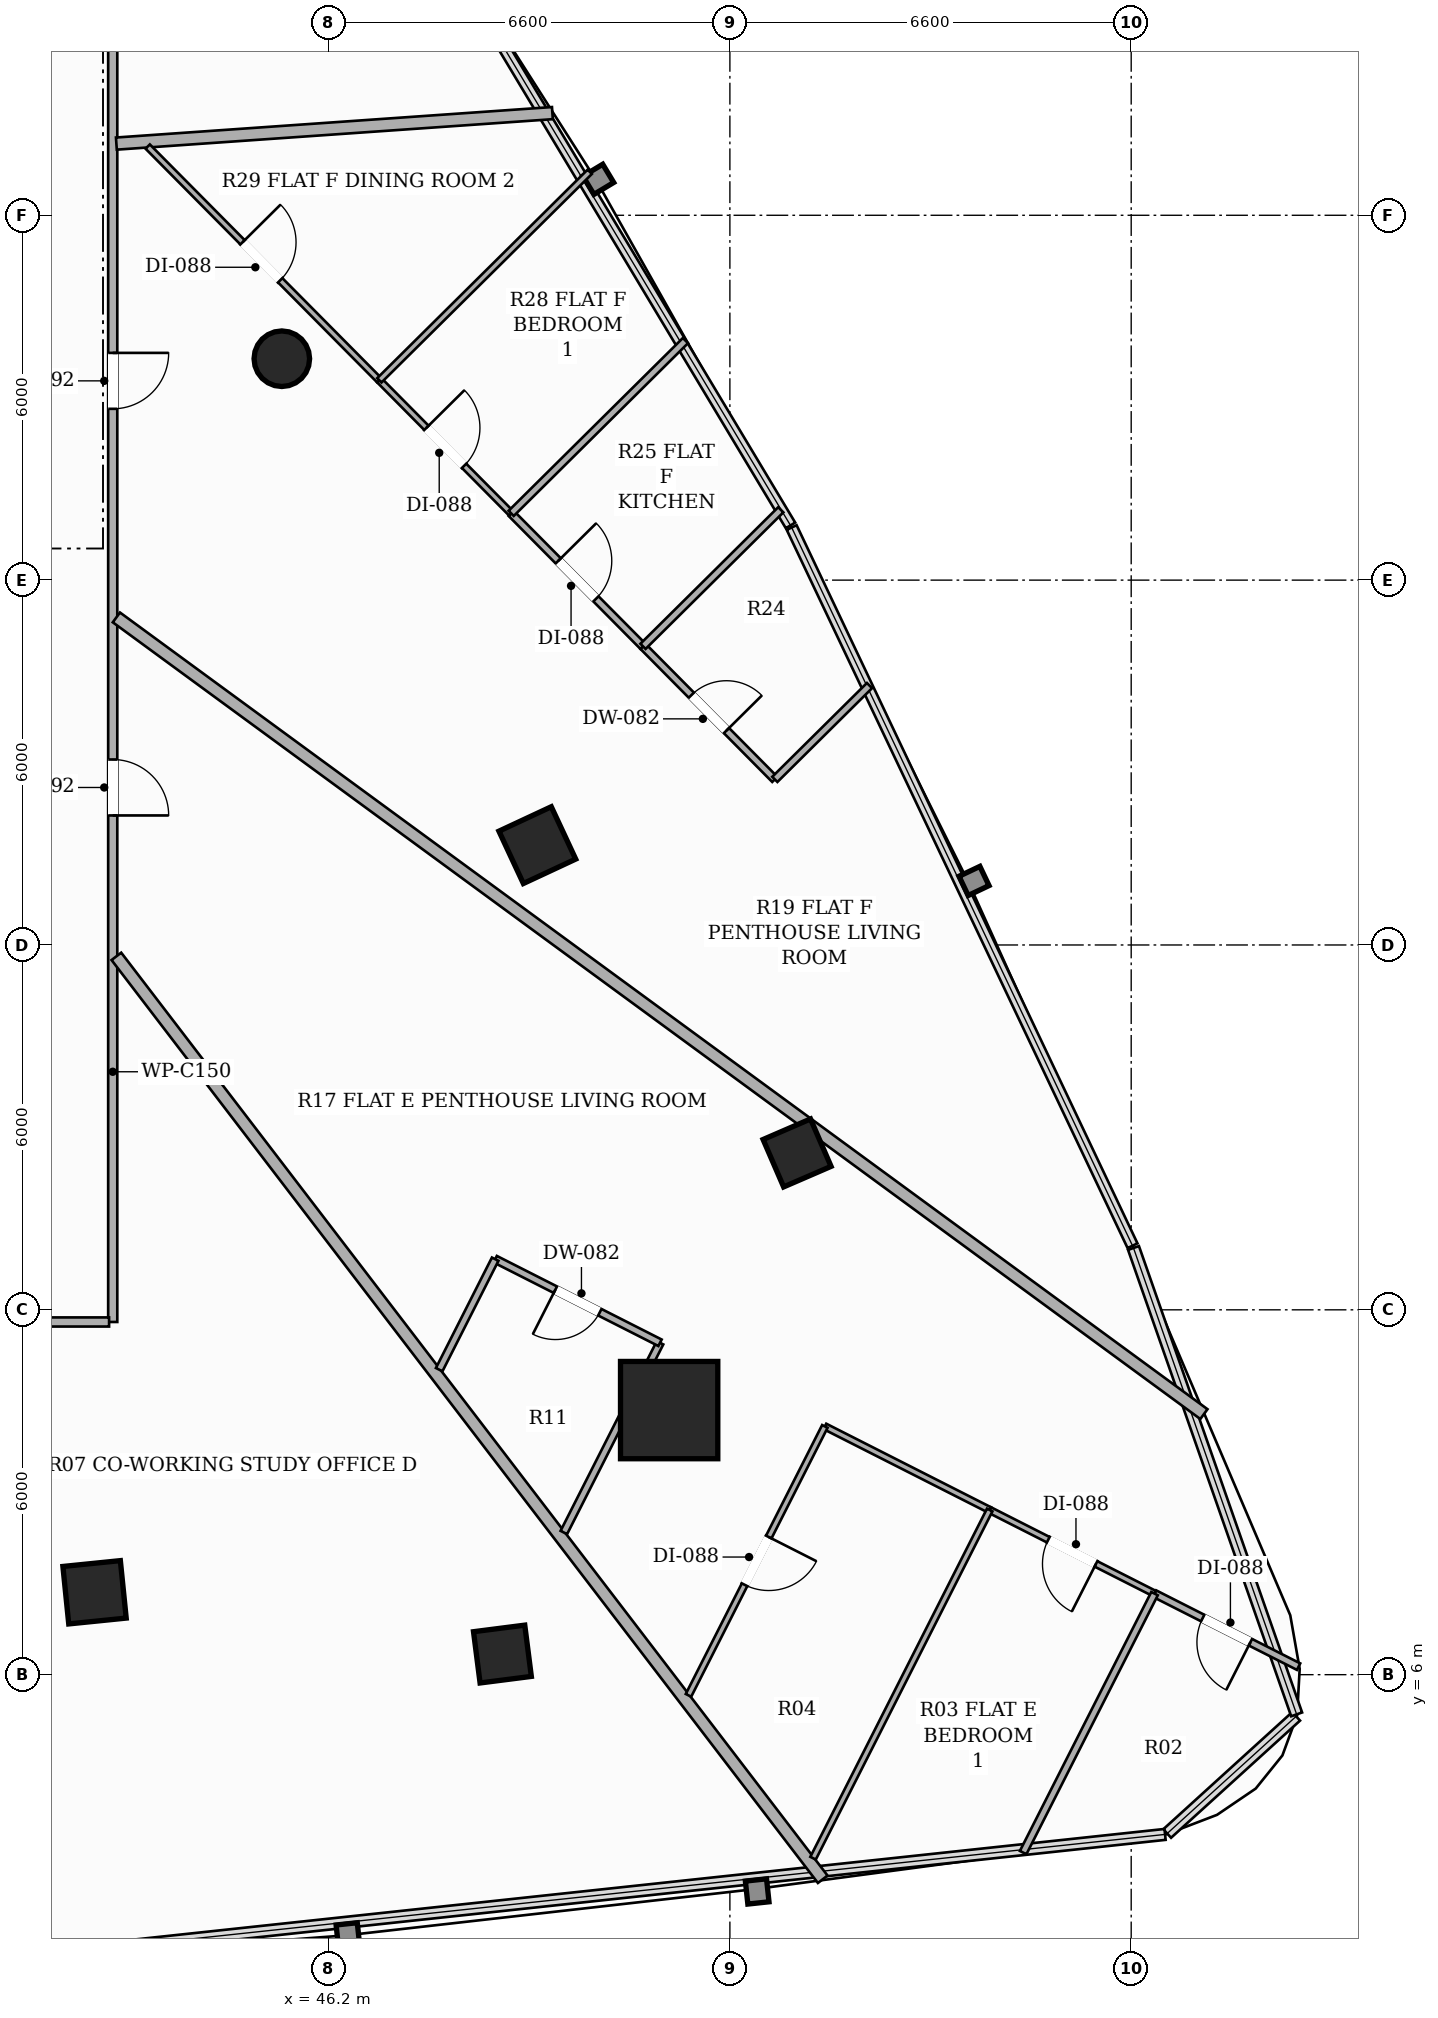
"""IFC4 building model, lengths in metres.
Left out: names, types, materials, properties, quantities, classifications, styles, units other than length and angle.
Written with IfcOpenShell. Run it as: python <this file> out.ifc"""

import sys

from ifc_helpers import new_model, si_unit, direction, frame, frame_2d, origin, origin_2d, place, context, subcontext, project, spatial, rectangle, hollow_rectangle, hollow_circle, extrude, element, fill, save


model = new_model("IFC4")
c1 = context("Model", 3, precision=1e-05, world=origin(), true_north=direction((0.0, 1.0)))
c2 = subcontext(c1, "Body", "Model", "MODEL_VIEW")
j1 = project(units=[si_unit("LENGTHUNIT", "METRE"), si_unit("PLANEANGLEUNIT", "RADIAN")], contexts=[c1])
p1 = place(None, origin())
s1 = spatial("IfcSite", under=j1, at=p1, CompositionType="ELEMENT")
p2 = place(p1, origin())
s2 = spatial("IfcBuilding", under=s1, at=p2, CompositionType="ELEMENT")
p3 = place(p2, frame((0.0, 0.0, 26.9)))
s3 = spatial("IfcBuildingStorey", under=s2, at=p3, CompositionType="ELEMENT", Elevation=26.9)
p4 = place(p3, frame((51.801, 10.351, 0.0), z_axis=(0.0, 0.0, 1.0), x_axis=(1.0, 0.0, 0.0)))
e1 = element("IfcColumn", 1, at=p4, inside=s3, PredefinedType="COLUMN", context=c2, shape_type="SweptSolid", body=[
    extrude(hollow_rectangle(XDim=1.6, YDim=1.6, WallThickness=0.05, at=origin_2d()), origin(), (0.0, 0.0, 1.0), 3.3),
])
for number, where, z_axis, x_axis in (
    (2, (42.351, 7.355, 0.0), (0.0, 0.0, 1.0), (0.995, 0.101, 0.0)),
    (3, (49.633, 19.642, 0.0), (0.0, 0.0, 1.0), (-0.423, 0.906, 0.0)),
):
    element("IfcColumn", number, at=place(p3, frame(where, z_axis=z_axis, x_axis=x_axis)), inside=s3, PredefinedType="COLUMN", context=c2, shape_type="SweptSolid", body=[
        extrude(hollow_rectangle(XDim=0.95, YDim=0.95, WallThickness=0.032, at=origin_2d()), origin(), (0.0, 0.0, 1.0), 3.3),
    ])
p5 = place(p3, frame((45.431, 27.641, 0.0), z_axis=(0.0, 0.0, 1.0), x_axis=(1.0, 0.0, 0.0)))
e4 = element("IfcColumn", 4, at=p5, inside=s3, PredefinedType="COLUMN", context=c2, shape_type="SweptSolid", body=[
    extrude(hollow_circle(Radius=0.457, WallThickness=0.025, at=origin_2d()), origin(), (0.0, 0.0, 1.0), 3.3),
])
for number, where, z_axis, x_axis in (
    (5, (49.059, 6.339, 0.0), (0.0, 0.0, 1.0), (0.992, 0.127, 0.0)),
    (6, (53.905, 14.58, 0.0), (0.0, 0.0, 1.0), (-0.397, 0.918, 0.0)),
):
    element("IfcColumn", number, at=place(p3, frame(where, z_axis=z_axis, x_axis=x_axis)), inside=s3, PredefinedType="COLUMN", context=c2, shape_type="SweptSolid", body=[
        extrude(hollow_rectangle(XDim=0.85, YDim=0.85, WallThickness=0.028, at=origin_2d()), origin(), (0.0, 0.0, 1.0), 3.3),
    ])
p6 = place(p3, frame((42.65, 36.84, 0.0), z_axis=(0.0, 0.0, 1.0), x_axis=(0.0, -1.0, 0.0)))
e7 = element("IfcWall", 7, at=p6, inside=s3, PredefinedType="PARTITIONING", context=c2, shape_type="SweptSolid", body=[
    extrude(rectangle(XDim=25.04, YDim=0.15, at=frame_2d((12.52, 0.0))), origin(), (0.0, 0.0, 1.0), 2.413),
])
p7 = place(p6, frame((2.543, 0.0, 0.0)))
e8 = element("IfcOpeningElement", 8, at=p7, cuts=e7, PredefinedType="OPENING", context=c2, shape_type="SweptSolid", body=[
    extrude(rectangle(XDim=0.88, YDim=2.1, at=frame_2d((0.44, 1.05))), frame((0.0, 0.085, 0.0), z_axis=(0.0, -1.0, 0.0), x_axis=(1.0, 0.0, 0.0)), (0.0, 0.0, 1.0), 0.17),
])
p8 = place(p6, frame((15.79, 0.0, 0.0)))
e9 = element("IfcOpeningElement", 9, at=p8, cuts=e7, PredefinedType="OPENING", context=c2, shape_type="SweptSolid", body=[
    extrude(rectangle(XDim=0.92, YDim=2.15, at=frame_2d((0.46, 1.075))), frame((0.0, 0.085, 0.0), z_axis=(0.0, -1.0, 0.0), x_axis=(1.0, 0.0, 0.0)), (0.0, 0.0, 1.0), 0.17),
])
p9 = place(p6, frame((9.103, 0.0, 0.0)))
e10 = element("IfcOpeningElement", 10, at=p9, cuts=e7, PredefinedType="OPENING", context=c2, shape_type="SweptSolid", body=[
    extrude(rectangle(XDim=0.92, YDim=2.15, at=frame_2d((0.46, 1.075))), frame((0.0, 0.085, 0.0), z_axis=(0.0, -1.0, 0.0), x_axis=(1.0, 0.0, 0.0)), (0.0, 0.0, 1.0), 0.17),
])
p10 = place(p3, frame((42.59, 11.8, 0.0), z_axis=(0.0, 0.0, 1.0), x_axis=(-1.0, 0.0, 0.0)))
e11 = element("IfcWall", 11, at=p10, inside=s3, PredefinedType="PARTITIONING", context=c2, shape_type="SweptSolid", body=[
    extrude(rectangle(XDim=19.24, YDim=0.15, at=frame_2d((9.62, 0.0))), origin(), (0.0, 0.0, 1.0), 2.669),
])
p11 = place(p10, frame((12.818, 0.0, 0.0)))
e12 = element("IfcOpeningElement", 12, at=p11, cuts=e11, PredefinedType="OPENING", context=c2, shape_type="SweptSolid", body=[
    extrude(rectangle(XDim=0.92, YDim=2.15, at=frame_2d((0.46, 1.075))), frame((0.0, 0.085, 0.0), z_axis=(0.0, -1.0, 0.0), x_axis=(1.0, 0.0, 0.0)), (0.0, 0.0, 1.0), 0.17),
])
p12 = place(p10, frame((3.519, 0.0, 0.0)))
e13 = element("IfcOpeningElement", 13, at=p12, cuts=e11, PredefinedType="OPENING", context=c2, shape_type="SweptSolid", body=[
    extrude(rectangle(XDim=0.88, YDim=2.1, at=frame_2d((0.44, 1.05))), frame((0.0, 0.085, 0.0), z_axis=(0.0, -1.0, 0.0), x_axis=(1.0, 0.0, 0.0)), (0.0, 0.0, 1.0), 0.17),
])
p13 = place(p3, frame((49.881, 31.68, 0.0), z_axis=(0.0, 0.0, 1.0), x_axis=(-0.997568680722, -0.069690223431, 0.0)))
e14 = element("IfcWall", 14, at=p13, inside=s3, PredefinedType="PARTITIONING", context=c2, shape_type="SweptSolid", body=[
    extrude(rectangle(XDim=7.189, YDim=0.2, at=frame_2d((3.594, 0.0))), origin(), (0.0, 0.0, 1.0), 2.413),
])
p14 = place(p3, frame((42.71, 17.813, 0.0), z_axis=(0.0, 0.0, 1.0), x_axis=(0.607788570878, -0.794098893784, 0.0)))
e15 = element("IfcWall", 15, at=p14, inside=s3, PredefinedType="PARTITIONING", context=c2, shape_type="SweptSolid", body=[
    extrude(rectangle(XDim=19.114, YDim=0.2, at=frame_2d((9.557, 0.0))), origin(), (0.0, 0.0, 1.0), 2.413),
])
p15 = place(p3, frame((42.71, 23.387, 0.0), z_axis=(0.0, 0.0, 1.0), x_axis=(0.806713303584, -0.590943014021, 0.0)))
e16 = element("IfcWall", 16, at=p15, inside=s3, PredefinedType="PARTITIONING", context=c2, shape_type="SweptSolid", body=[
    extrude(rectangle(XDim=22.171, YDim=0.2, at=frame_2d((11.086, 0.0))), origin(), (0.0, 0.0, 1.0), 2.413),
])
p16 = place(p3, frame((50.069, 8.338, 0.0), z_axis=(0.0, 0.0, 1.0), x_axis=(0.45217581214, 0.891928828391, 0.0)))
e17 = element("IfcWall", 17, at=p16, inside=s3, PredefinedType="PARTITIONING", context=c2, shape_type="SweptSolid", body=[
    extrude(rectangle(XDim=3.498, YDim=0.12, at=frame_2d((1.749, 0.0))), origin(), (0.0, 0.0, 1.0), 2.413),
])
p17 = place(p3, frame((51.651, 11.458, 0.0), z_axis=(0.0, 0.0, 1.0), x_axis=(-0.891842269509, 0.452346511336, 0.0)))
e18 = element("IfcWall", 18, at=p17, inside=s3, PredefinedType="PARTITIONING", context=c2, shape_type="SweptSolid", body=[
    extrude(rectangle(XDim=3.04, YDim=0.12, at=frame_2d((1.52, 0.0))), origin(), (0.0, 0.0, 1.0), 2.413),
])
p18 = place(p17, frame((1.11, 0.0, 0.0)))
e19 = element("IfcOpeningElement", 19, at=p18, cuts=e18, PredefinedType="OPENING", context=c2, shape_type="SweptSolid", body=[
    extrude(rectangle(XDim=0.82, YDim=2.1, at=frame_2d((0.41, 1.05))), frame((0.0, 0.07, 0.0), z_axis=(0.0, -1.0, 0.0), x_axis=(1.0, 0.0, 0.0)), (0.0, 0.0, 1.0), 0.14),
])
p19 = place(p3, frame((48.94, 12.833, 0.0), z_axis=(0.0, 0.0, 1.0), x_axis=(-0.452097038501, -0.891968759418, 0.0)))
e20 = element("IfcWall", 20, at=p19, inside=s3, PredefinedType="PARTITIONING", context=c2, shape_type="SweptSolid", body=[
    extrude(rectangle(XDim=2.037, YDim=0.12, at=frame_2d((1.019, 0.0))), origin(), (0.0, 0.0, 1.0), 3.06),
])
p20 = place(p3, frame((62.153, 6.132, 0.0), z_axis=(0.0, 0.0, 1.0), x_axis=(-0.891950280654, 0.452133494491, 0.0)))
e21 = element("IfcWall", 21, at=p20, inside=s3, PredefinedType="PARTITIONING", context=c2, shape_type="SweptSolid", body=[
    extrude(rectangle(XDim=2.656, YDim=0.12, at=frame_2d((1.328, 0.0))), origin(), (0.0, 0.0, 1.0), 3.06),
])
p21 = place(p20, frame((0.888, 0.0, 0.0)))
e22 = element("IfcOpeningElement", 22, at=p21, cuts=e21, PredefinedType="OPENING", context=c2, shape_type="SweptSolid", body=[
    extrude(rectangle(XDim=0.88, YDim=2.1, at=frame_2d((0.44, 1.05))), frame((0.0, 0.07, 0.0), z_axis=(0.0, -1.0, 0.0), x_axis=(1.0, 0.0, 0.0)), (0.0, 0.0, 1.0), 0.14),
])
p22 = place(p3, frame((59.784, 7.333, 0.0), z_axis=(0.0, 0.0, 1.0), x_axis=(-0.891842269509, 0.452346511336, 0.0)))
e23 = element("IfcWall", 23, at=p22, inside=s3, PredefinedType="PARTITIONING", context=c2, shape_type="SweptSolid", body=[
    extrude(rectangle(XDim=3.04, YDim=0.1, at=frame_2d((1.52, 0.0))), origin(), (0.0, 0.0, 1.0), 3.06),
])
p23 = place(p22, frame((1.08, 0.0, 0.0)))
e24 = element("IfcOpeningElement", 24, at=p23, cuts=e23, PredefinedType="OPENING", context=c2, shape_type="SweptSolid", body=[
    extrude(rectangle(XDim=0.88, YDim=2.1, at=frame_2d((0.44, 1.05))), frame((0.0, 0.06, 0.0), z_axis=(0.0, -1.0, 0.0), x_axis=(1.0, 0.0, 0.0)), (0.0, 0.0, 1.0), 0.12),
])
p24 = place(p3, frame((57.073, 8.708, 0.0), z_axis=(0.0, 0.0, 1.0), x_axis=(-0.891842269509, 0.452346511336, 0.0)))
e25 = element("IfcWall", 25, at=p24, inside=s3, PredefinedType="PARTITIONING", context=c2, shape_type="SweptSolid", body=[
    extrude(rectangle(XDim=3.04, YDim=0.1, at=frame_2d((1.52, 0.0))), origin(), (0.0, 0.0, 1.0), 2.619),
])
p25 = place(p3, frame((54.362, 10.083, 0.0), z_axis=(0.0, 0.0, 1.0), x_axis=(-0.452306340277, -0.891862643317, 0.0)))
e26 = element("IfcWall", 26, at=p25, inside=s3, PredefinedType="PARTITIONING", context=c2, shape_type="SweptSolid", body=[
    extrude(rectangle(XDim=4.959, YDim=0.1, at=frame_2d((2.48, 0.0))), origin(), (0.0, 0.0, 1.0), 3.06),
])
p26 = place(p25, frame((2.04, 0.0, 0.0)))
e27 = element("IfcOpeningElement", 27, at=p26, cuts=e26, PredefinedType="OPENING", context=c2, shape_type="SweptSolid", body=[
    extrude(rectangle(XDim=0.88, YDim=2.1, at=frame_2d((0.44, 1.05))), frame((0.0, 0.06, 0.0), z_axis=(0.0, -1.0, 0.0), x_axis=(1.0, 0.0, 0.0)), (0.0, 0.0, 1.0), 0.12),
])
p27 = place(p3, frame((57.623, 3.074, 0.0), z_axis=(0.0, 0.0, 1.0), x_axis=(0.452460987707, 0.891784197328, 0.0)))
e28 = element("IfcWall", 28, at=p27, inside=s3, PredefinedType="PARTITIONING", context=c2, shape_type="SweptSolid", body=[
    extrude(rectangle(XDim=4.776, YDim=0.12, at=frame_2d((2.388, 0.0))), origin(), (0.0, 0.0, 1.0), 3.06),
])
p28 = place(p3, frame((54.168, 2.982, 0.0), z_axis=(0.0, 0.0, 1.0), x_axis=(0.452437935158, 0.891795893033, 0.0)))
e29 = element("IfcWall", 29, at=p28, inside=s3, PredefinedType="PARTITIONING", context=c2, shape_type="SweptSolid", body=[
    extrude(rectangle(XDim=6.421, YDim=0.1, at=frame_2d((3.21, 0.0))), origin(), (0.0, 0.0, 1.0), 2.619),
])
p29 = place(p3, frame((51.371, 22.911, 0.0), z_axis=(0.0, 0.0, 1.0), x_axis=(0.703849557614, -0.710349069294, 0.0)))
e30 = element("IfcWall", 30, at=p29, inside=s3, PredefinedType="PARTITIONING", context=c2, shape_type="SweptSolid", body=[
    extrude(rectangle(XDim=3.08, YDim=0.12, at=frame_2d((1.54, 0.0))), origin(), (0.0, 0.0, 1.0), 3.06),
])
p30 = place(p29, frame((1.13, 0.0, 0.0)))
e31 = element("IfcOpeningElement", 31, at=p30, cuts=e30, PredefinedType="OPENING", context=c2, shape_type="SweptSolid", body=[
    extrude(rectangle(XDim=0.82, YDim=2.1, at=frame_2d((0.41, 1.05))), frame((0.0, 0.07, 0.0), z_axis=(0.0, -1.0, 0.0), x_axis=(1.0, 0.0, 0.0)), (0.0, 0.0, 1.0), 0.14),
])
p31 = place(p3, frame((53.539, 20.723, 0.0), z_axis=(0.0, 0.0, 1.0), x_axis=(0.710218316827, 0.703981492969, 0.0)))
e32 = element("IfcWall", 32, at=p31, inside=s3, PredefinedType="PARTITIONING", context=c2, shape_type="SweptSolid", body=[
    extrude(rectangle(XDim=2.192, YDim=0.12, at=frame_2d((1.096, 0.0))), origin(), (0.0, 0.0, 1.0), 3.06),
])
p32 = place(p3, frame((49.203, 25.098, 0.0), z_axis=(0.0, 0.0, 1.0), x_axis=(0.704048077172, -0.710152311149, 0.0)))
e33 = element("IfcWall", 33, at=p32, inside=s3, PredefinedType="PARTITIONING", context=c2, shape_type="SweptSolid", body=[
    extrude(rectangle(XDim=3.08, YDim=0.12, at=frame_2d((1.54, 0.0))), origin(), (0.0, 0.0, 1.0), 3.06),
])
p33 = place(p32, frame((1.1, 0.0, 0.0)))
e34 = element("IfcOpeningElement", 34, at=p33, cuts=e33, PredefinedType="OPENING", context=c2, shape_type="SweptSolid", body=[
    extrude(rectangle(XDim=0.88, YDim=2.1, at=frame_2d((0.44, 1.05))), frame((0.0, 0.07, 0.0), z_axis=(0.0, -1.0, 0.0), x_axis=(1.0, 0.0, 0.0)), (0.0, 0.0, 1.0), 0.14),
])
p34 = place(p3, frame((47.035, 27.286, 0.0), z_axis=(0.0, 0.0, 1.0), x_axis=(0.703849557614, -0.710349069294, 0.0)))
e35 = element("IfcWall", 35, at=p34, inside=s3, PredefinedType="PARTITIONING", context=c2, shape_type="SweptSolid", body=[
    extrude(rectangle(XDim=3.08, YDim=0.1, at=frame_2d((1.54, 0.0))), origin(), (0.0, 0.0, 1.0), 3.06),
])
p35 = place(p34, frame((1.1, 0.0, 0.0)))
e36 = element("IfcOpeningElement", 36, at=p35, cuts=e35, PredefinedType="OPENING", context=c2, shape_type="SweptSolid", body=[
    extrude(rectangle(XDim=0.88, YDim=2.1, at=frame_2d((0.44, 1.05))), frame((0.0, 0.06, 0.0), z_axis=(0.0, -1.0, 0.0), x_axis=(1.0, 0.0, 0.0)), (0.0, 0.0, 1.0), 0.12),
])
p36 = place(p3, frame((43.225, 31.13, 0.0), z_axis=(0.0, 0.0, 1.0), x_axis=(0.703942028385, -0.710257432677, 0.0)))
e37 = element("IfcWall", 37, at=p36, inside=s3, PredefinedType="PARTITIONING", context=c2, shape_type="SweptSolid", body=[
    extrude(rectangle(XDim=5.412, YDim=0.1, at=frame_2d((2.706, 0.0))), origin(), (0.0, 0.0, 1.0), 2.413),
])
p37 = place(p36, frame((2.216, 0.0, 0.0)))
e38 = element("IfcOpeningElement", 38, at=p37, cuts=e37, PredefinedType="OPENING", context=c2, shape_type="SweptSolid", body=[
    extrude(rectangle(XDim=0.88, YDim=2.1, at=frame_2d((0.44, 1.05))), frame((0.0, 0.06, 0.0), z_axis=(0.0, -1.0, 0.0), x_axis=(1.0, 0.0, 0.0)), (0.0, 0.0, 1.0), 0.12),
])
p38 = place(p3, frame((51.371, 22.911, 0.0), z_axis=(0.0, 0.0, 1.0), x_axis=(0.710199123854, 0.704000855452, 0.0)))
e39 = element("IfcWall", 39, at=p38, inside=s3, PredefinedType="PARTITIONING", context=c2, shape_type="SweptSolid", body=[
    extrude(rectangle(XDim=3.19, YDim=0.12, at=frame_2d((1.595, 0.0))), origin(), (0.0, 0.0, 1.0), 3.06),
])
p39 = place(p3, frame((49.203, 25.098, 0.0), z_axis=(0.0, 0.0, 1.0), x_axis=(0.710215428297, 0.703984407078, 0.0)))
e40 = element("IfcWall", 40, at=p39, inside=s3, PredefinedType="PARTITIONING", context=c2, shape_type="SweptSolid", body=[
    extrude(rectangle(XDim=4.036, YDim=0.12, at=frame_2d((2.018, 0.0))), origin(), (0.0, 0.0, 1.0), 3.06),
])
p40 = place(p3, frame((47.035, 27.286, 0.0), z_axis=(0.0, 0.0, 1.0), x_axis=(0.71028193183, 0.703917308578, 0.0)))
e41 = element("IfcWall", 41, at=p40, inside=s3, PredefinedType="PARTITIONING", context=c2, shape_type="SweptSolid", body=[
    extrude(rectangle(XDim=4.872, YDim=0.1, at=frame_2d((2.436, 0.0))), origin(), (0.0, 0.0, 1.0), 3.06),
])
p41 = place(p8, origin())
e42 = element("IfcDoor", 42, at=p41, inside=s3, OperationType="SINGLE_SWING_RIGHT", PredefinedType="DOOR", context=c2, shape_type="SweptSolid", body=[
    extrude(rectangle(XDim=0.92, YDim=2.15, at=frame_2d((0.46, 1.075))), frame((0.0, 0.025, 0.0), z_axis=(0.0, -1.0, 0.0), x_axis=(1.0, 0.0, 0.0)), (0.0, 0.0, 1.0), 0.05),
])
fill(e9, e42)
p42 = place(p18, origin())
e43 = element("IfcDoor", 43, at=p42, inside=s3, OperationType="SINGLE_SWING_RIGHT", PredefinedType="DOOR", context=c2, shape_type="SweptSolid", body=[
    extrude(rectangle(XDim=0.82, YDim=2.1, at=frame_2d((0.41, 1.05))), frame((0.0, 0.025, 0.0), z_axis=(0.0, -1.0, 0.0), x_axis=(1.0, 0.0, 0.0)), (0.0, 0.0, 1.0), 0.05),
])
fill(e19, e43)
p43 = place(p21, origin())
e44 = element("IfcDoor", 44, at=p43, inside=s3, OperationType="SINGLE_SWING_LEFT", PredefinedType="DOOR", context=c2, shape_type="SweptSolid", body=[
    extrude(rectangle(XDim=0.88, YDim=2.1, at=frame_2d((0.44, 1.05))), frame((0.0, 0.025, 0.0), z_axis=(0.0, -1.0, 0.0), x_axis=(1.0, 0.0, 0.0)), (0.0, 0.0, 1.0), 0.05),
])
fill(e22, e44)
p44 = place(p23, origin())
e45 = element("IfcDoor", 45, at=p44, inside=s3, OperationType="SINGLE_SWING_LEFT", PredefinedType="DOOR", context=c2, shape_type="SweptSolid", body=[
    extrude(rectangle(XDim=0.88, YDim=2.1, at=frame_2d((0.44, 1.05))), frame((0.0, 0.025, 0.0), z_axis=(0.0, -1.0, 0.0), x_axis=(1.0, 0.0, 0.0)), (0.0, 0.0, 1.0), 0.05),
])
fill(e24, e45)
p45 = place(p26, origin())
e46 = element("IfcDoor", 46, at=p45, inside=s3, OperationType="SINGLE_SWING_LEFT", PredefinedType="DOOR", context=c2, shape_type="SweptSolid", body=[
    extrude(rectangle(XDim=0.88, YDim=2.1, at=frame_2d((0.44, 1.05))), frame((0.0, 0.025, 0.0), z_axis=(0.0, -1.0, 0.0), x_axis=(1.0, 0.0, 0.0)), (0.0, 0.0, 1.0), 0.05),
])
fill(e27, e46)
p46 = place(p9, origin())
e47 = element("IfcDoor", 47, at=p46, inside=s3, OperationType="SINGLE_SWING_LEFT", PredefinedType="DOOR", context=c2, shape_type="SweptSolid", body=[
    extrude(rectangle(XDim=0.92, YDim=2.15, at=frame_2d((0.46, 1.075))), frame((0.0, 0.025, 0.0), z_axis=(0.0, -1.0, 0.0), x_axis=(1.0, 0.0, 0.0)), (0.0, 0.0, 1.0), 0.05),
])
fill(e10, e47)
p47 = place(p30, origin())
e48 = element("IfcDoor", 48, at=p47, inside=s3, OperationType="SINGLE_SWING_RIGHT", PredefinedType="DOOR", context=c2, shape_type="SweptSolid", body=[
    extrude(rectangle(XDim=0.82, YDim=2.1, at=frame_2d((0.41, 1.05))), frame((0.0, 0.025, 0.0), z_axis=(0.0, -1.0, 0.0), x_axis=(1.0, 0.0, 0.0)), (0.0, 0.0, 1.0), 0.05),
])
fill(e31, e48)
p48 = place(p33, origin())
e49 = element("IfcDoor", 49, at=p48, inside=s3, OperationType="SINGLE_SWING_LEFT", PredefinedType="DOOR", context=c2, shape_type="SweptSolid", body=[
    extrude(rectangle(XDim=0.88, YDim=2.1, at=frame_2d((0.44, 1.05))), frame((0.0, 0.025, 0.0), z_axis=(0.0, -1.0, 0.0), x_axis=(1.0, 0.0, 0.0)), (0.0, 0.0, 1.0), 0.05),
])
fill(e34, e49)
p49 = place(p35, origin())
e50 = element("IfcDoor", 50, at=p49, inside=s3, OperationType="SINGLE_SWING_LEFT", PredefinedType="DOOR", context=c2, shape_type="SweptSolid", body=[
    extrude(rectangle(XDim=0.88, YDim=2.1, at=frame_2d((0.44, 1.05))), frame((0.0, 0.025, 0.0), z_axis=(0.0, -1.0, 0.0), x_axis=(1.0, 0.0, 0.0)), (0.0, 0.0, 1.0), 0.05),
])
fill(e36, e50)
p50 = place(p37, origin())
e51 = element("IfcDoor", 51, at=p50, inside=s3, OperationType="SINGLE_SWING_LEFT", PredefinedType="DOOR", context=c2, shape_type="SweptSolid", body=[
    extrude(rectangle(XDim=0.88, YDim=2.1, at=frame_2d((0.44, 1.05))), frame((0.0, 0.025, 0.0), z_axis=(0.0, -1.0, 0.0), x_axis=(1.0, 0.0, 0.0)), (0.0, 0.0, 1.0), 0.05),
])
fill(e38, e51)
save(model, sys.argv[1])
